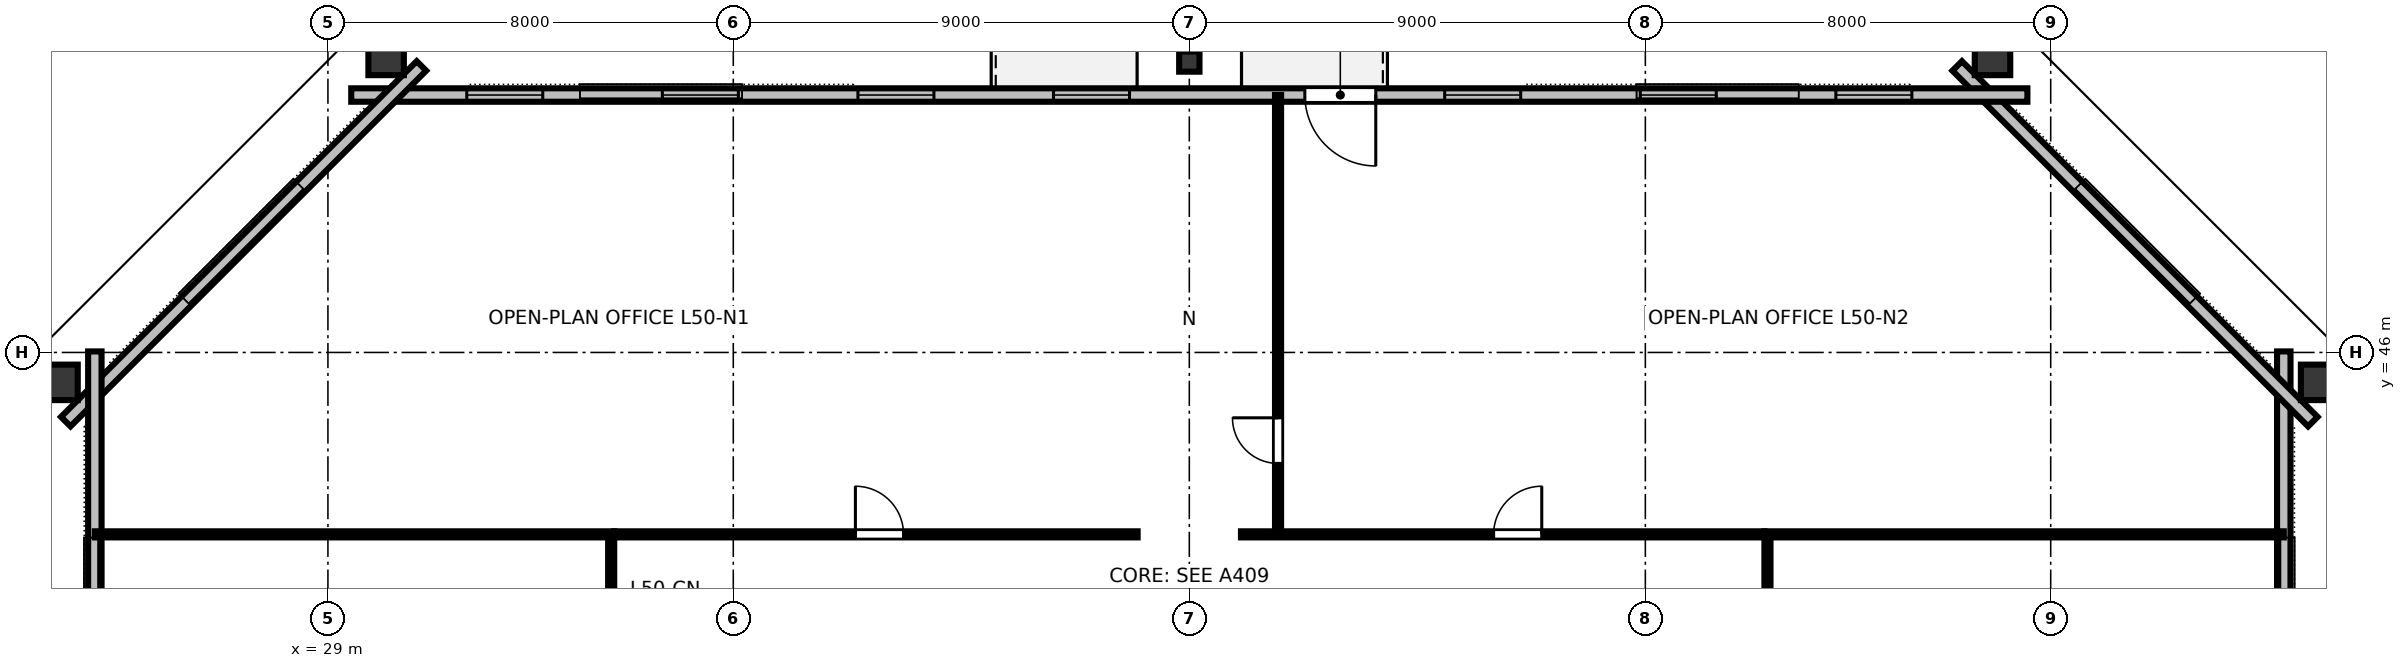
"""IFC4 building model, lengths in metres.
Left out: names, types, materials, properties, quantities, classifications, styles, units other than length and angle.
Written with IfcOpenShell. Run it as: python <this file> out.ifc"""

import sys

from ifc_helpers import new_model, si_unit, direction, frame, frame_2d, origin, origin_2d, place, context, subcontext, project, spatial, rectangle, hollow_rectangle, i_section, extrude, element, fill, save


model = new_model("IFC4")
c1 = context("Model", 3, precision=1e-05, world=origin(), true_north=direction((0.0, 1.0)))
c2 = subcontext(c1, "Body", "Model", "MODEL_VIEW")
j1 = project(units=[si_unit("LENGTHUNIT", "METRE"), si_unit("PLANEANGLEUNIT", "RADIAN")], contexts=[c1])
p1 = place(None, origin())
s1 = spatial("IfcSite", under=j1, at=p1, CompositionType="ELEMENT")
p2 = place(p1, origin())
s2 = spatial("IfcBuilding", under=s1, at=p2, CompositionType="ELEMENT")
p3 = place(p2, frame((0.0, 0.0, 191.4)))
s3 = spatial("IfcBuildingStorey", under=s2, at=p3, CompositionType="ELEMENT", Elevation=191.4)
for number, where, z_axis, x_axis in (
    (1, (68.363, 45.41, 0.0), (0.0, 0.0, 1.0), (0.0, 1.0, 0.0)),
    (2, (61.851, 51.897, 0.0), (0.0, 0.0, 1.0), (1.0, 0.0, 0.0)),
):
    element("IfcColumn", number, at=place(p3, frame(where, z_axis=z_axis, x_axis=x_axis)), inside=s3, PredefinedType="COLUMN", context=c2, shape_type="SweptSolid", body=[
        extrude(hollow_rectangle(XDim=0.7, YDim=0.85, WallThickness=0.04, at=origin_2d()), origin(), (0.0, 0.0, 1.0), 3.373),
    ])
p4 = place(p3, frame((46.0, 51.74, 0.0), z_axis=(0.0, 0.0, 1.0), x_axis=(1.0, 0.0, 0.0)))
e3 = element("IfcColumn", 3, at=p4, inside=s3, PredefinedType="COLUMN", context=c2, shape_type="SweptSolid", body=[
    extrude(i_section(OverallWidth=0.401, OverallDepth=0.399, WebThickness=0.025, FlangeThickness=0.04, FilletRadius=0.025, at=origin_2d()), origin(), (0.0, 0.0, 1.0), 3.373),
])
for number, where, z_axis, x_axis in (
    (4, (30.149, 51.897, 0.0), (0.0, 0.0, 1.0), (1.0, 0.0, 0.0)),
    (5, (23.637, 45.41, 0.0), (0.0, 0.0, 1.0), (0.0, 1.0, 0.0)),
):
    element("IfcColumn", number, at=place(p3, frame(where, z_axis=z_axis, x_axis=x_axis)), inside=s3, PredefinedType="COLUMN", context=c2, shape_type="SweptSolid", body=[
        extrude(hollow_rectangle(XDim=0.7, YDim=0.85, WallThickness=0.04, at=origin_2d()), origin(), (0.0, 0.0, 1.0), 3.373),
    ])
p5 = place(p3, frame((67.6, 17.98, 0.0), z_axis=(0.0, 0.0, 1.0), x_axis=(0.0, 1.0, 0.0)))
e6 = element("IfcWall", 6, at=p5, inside=s3, PredefinedType="STANDARD", context=c2, shape_type="SweptSolid", body=[
    extrude(rectangle(XDim=28.04, YDim=0.265, at=frame_2d((14.02, 0.0))), origin(), (0.0, 0.0, 1.0), 3.375),
])
p6 = place(p5, frame((5.887, 0.0, 0.85)))
e7 = element("IfcOpeningElement", 7, at=p6, cuts=e6, PredefinedType="OPENING", context=c2, shape_type="SweptSolid", body=[
    extrude(rectangle(XDim=1.5, YDim=1.85, at=frame_2d((0.75, 0.925))), frame((0.0, 0.142, 0.0), z_axis=(0.0, -1.0, 0.0), x_axis=(1.0, 0.0, 0.0)), (0.0, 0.0, 1.0), 0.285),
])
p7 = place(p5, frame((9.579, 0.0, 0.85)))
e8 = element("IfcOpeningElement", 8, at=p7, cuts=e6, PredefinedType="OPENING", context=c2, shape_type="SweptSolid", body=[
    extrude(rectangle(XDim=1.5, YDim=1.85, at=frame_2d((0.75, 0.925))), frame((0.0, 0.142, 0.0), z_axis=(0.0, -1.0, 0.0), x_axis=(1.0, 0.0, 0.0)), (0.0, 0.0, 1.0), 0.285),
])
p8 = place(p5, frame((16.961, 0.0, 0.85)))
e9 = element("IfcOpeningElement", 9, at=p8, cuts=e6, PredefinedType="OPENING", context=c2, shape_type="SweptSolid", body=[
    extrude(rectangle(XDim=1.5, YDim=1.85, at=frame_2d((0.75, 0.925))), frame((0.0, 0.142, 0.0), z_axis=(0.0, -1.0, 0.0), x_axis=(1.0, 0.0, 0.0)), (0.0, 0.0, 1.0), 0.285),
])
p9 = place(p5, frame((20.653, 0.0, 0.85)))
e10 = element("IfcOpeningElement", 10, at=p9, cuts=e6, PredefinedType="OPENING", context=c2, shape_type="SweptSolid", body=[
    extrude(rectangle(XDim=1.5, YDim=1.85, at=frame_2d((0.75, 0.925))), frame((0.0, 0.142, 0.0), z_axis=(0.0, -1.0, 0.0), x_axis=(1.0, 0.0, 0.0)), (0.0, 0.0, 1.0), 0.285),
])
p10 = place(p3, frame((68.174, 44.635, 0.0), z_axis=(0.0, 0.0, 1.0), x_axis=(-0.707106781187, 0.707106781187, 0.0)))
e11 = element("IfcWall", 11, at=p10, inside=s3, PredefinedType="STANDARD", context=c2, shape_type="SweptSolid", body=[
    extrude(rectangle(XDim=9.927, YDim=0.265, at=frame_2d((4.963, 0.0))), origin(), (0.0, 0.0, 1.0), 3.375),
])
p11 = place(p3, frame((62.54, 51.08, 0.0), z_axis=(0.0, 0.0, 1.0), x_axis=(-1.0, 0.0, 0.0)))
e12 = element("IfcWall", 12, at=p11, inside=s3, PredefinedType="STANDARD", context=c2, shape_type="SweptSolid", body=[
    extrude(rectangle(XDim=33.08, YDim=0.265, at=frame_2d((16.54, 0.0))), origin(), (0.0, 0.0, 1.0), 3.375),
])
p12 = place(p11, frame((12.86, 0.0, 0.0)))
e13 = element("IfcOpeningElement", 13, at=p12, cuts=e12, PredefinedType="OPENING", context=c2, shape_type="SweptSolid", body=[
    extrude(rectangle(XDim=1.4, YDim=2.15, at=frame_2d((0.7, 1.075))), frame((0.0, 0.142, 0.0), z_axis=(0.0, -1.0, 0.0), x_axis=(1.0, 0.0, 0.0)), (0.0, 0.0, 1.0), 0.285),
])
p13 = place(p11, frame((2.28, 0.0, 0.85)))
e14 = element("IfcOpeningElement", 14, at=p13, cuts=e12, PredefinedType="OPENING", context=c2, shape_type="SweptSolid", body=[
    extrude(rectangle(XDim=1.5, YDim=1.85, at=frame_2d((0.75, 0.925))), frame((0.0, 0.142, 0.0), z_axis=(0.0, -1.0, 0.0), x_axis=(1.0, 0.0, 0.0)), (0.0, 0.0, 1.0), 0.285),
])
p14 = place(p11, frame((6.14, 0.0, 0.85)))
e15 = element("IfcOpeningElement", 15, at=p14, cuts=e12, PredefinedType="OPENING", context=c2, shape_type="SweptSolid", body=[
    extrude(rectangle(XDim=1.5, YDim=1.85, at=frame_2d((0.75, 0.925))), frame((0.0, 0.142, 0.0), z_axis=(0.0, -1.0, 0.0), x_axis=(1.0, 0.0, 0.0)), (0.0, 0.0, 1.0), 0.285),
])
p15 = place(p11, frame((10.0, 0.0, 0.85)))
e16 = element("IfcOpeningElement", 16, at=p15, cuts=e12, PredefinedType="OPENING", context=c2, shape_type="SweptSolid", body=[
    extrude(rectangle(XDim=1.5, YDim=1.85, at=frame_2d((0.75, 0.925))), frame((0.0, 0.142, 0.0), z_axis=(0.0, -1.0, 0.0), x_axis=(1.0, 0.0, 0.0)), (0.0, 0.0, 1.0), 0.285),
])
p16 = place(p11, frame((17.72, 0.0, 0.85)))
e17 = element("IfcOpeningElement", 17, at=p16, cuts=e12, PredefinedType="OPENING", context=c2, shape_type="SweptSolid", body=[
    extrude(rectangle(XDim=1.5, YDim=1.85, at=frame_2d((0.75, 0.925))), frame((0.0, 0.142, 0.0), z_axis=(0.0, -1.0, 0.0), x_axis=(1.0, 0.0, 0.0)), (0.0, 0.0, 1.0), 0.285),
])
p17 = place(p11, frame((21.58, 0.0, 0.85)))
e18 = element("IfcOpeningElement", 18, at=p17, cuts=e12, PredefinedType="OPENING", context=c2, shape_type="SweptSolid", body=[
    extrude(rectangle(XDim=1.5, YDim=1.85, at=frame_2d((0.75, 0.925))), frame((0.0, 0.142, 0.0), z_axis=(0.0, -1.0, 0.0), x_axis=(1.0, 0.0, 0.0)), (0.0, 0.0, 1.0), 0.285),
])
p18 = place(p11, frame((25.44, 0.0, 0.85)))
e19 = element("IfcOpeningElement", 19, at=p18, cuts=e12, PredefinedType="OPENING", context=c2, shape_type="SweptSolid", body=[
    extrude(rectangle(XDim=1.5, YDim=1.85, at=frame_2d((0.75, 0.925))), frame((0.0, 0.142, 0.0), z_axis=(0.0, -1.0, 0.0), x_axis=(1.0, 0.0, 0.0)), (0.0, 0.0, 1.0), 0.285),
])
p19 = place(p11, frame((29.3, 0.0, 0.85)))
e20 = element("IfcOpeningElement", 20, at=p19, cuts=e12, PredefinedType="OPENING", context=c2, shape_type="SweptSolid", body=[
    extrude(rectangle(XDim=1.5, YDim=1.85, at=frame_2d((0.75, 0.925))), frame((0.0, 0.142, 0.0), z_axis=(0.0, -1.0, 0.0), x_axis=(1.0, 0.0, 0.0)), (0.0, 0.0, 1.0), 0.285),
])
p20 = place(p3, frame((30.845, 51.654, 0.0), z_axis=(0.0, 0.0, 1.0), x_axis=(-0.707106781187, -0.707106781187, 0.0)))
e21 = element("IfcWall", 21, at=p20, inside=s3, PredefinedType="STANDARD", context=c2, shape_type="SweptSolid", body=[
    extrude(rectangle(XDim=9.927, YDim=0.265, at=frame_2d((4.963, 0.0))), origin(), (0.0, 0.0, 1.0), 3.375),
])
p21 = place(p3, frame((24.4, 46.02, 0.0), z_axis=(0.0, 0.0, 1.0), x_axis=(0.0, -1.0, 0.0)))
e22 = element("IfcWall", 22, at=p21, inside=s3, PredefinedType="STANDARD", context=c2, shape_type="SweptSolid", body=[
    extrude(rectangle(XDim=28.04, YDim=0.265, at=frame_2d((14.02, 0.0))), origin(), (0.0, 0.0, 1.0), 3.375),
])
p22 = place(p21, frame((5.887, 0.0, 0.85)))
e23 = element("IfcOpeningElement", 23, at=p22, cuts=e22, PredefinedType="OPENING", context=c2, shape_type="SweptSolid", body=[
    extrude(rectangle(XDim=1.5, YDim=1.85, at=frame_2d((0.75, 0.925))), frame((0.0, 0.142, 0.0), z_axis=(0.0, -1.0, 0.0), x_axis=(1.0, 0.0, 0.0)), (0.0, 0.0, 1.0), 0.285),
])
p23 = place(p21, frame((16.961, 0.0, 0.85)))
e24 = element("IfcOpeningElement", 24, at=p23, cuts=e22, PredefinedType="OPENING", context=c2, shape_type="SweptSolid", body=[
    extrude(rectangle(XDim=1.5, YDim=1.85, at=frame_2d((0.75, 0.925))), frame((0.0, 0.142, 0.0), z_axis=(0.0, -1.0, 0.0), x_axis=(1.0, 0.0, 0.0)), (0.0, 0.0, 1.0), 0.285),
])
p24 = place(p21, frame((20.653, 0.0, 0.85)))
e25 = element("IfcOpeningElement", 25, at=p24, cuts=e22, PredefinedType="OPENING", context=c2, shape_type="SweptSolid", body=[
    extrude(rectangle(XDim=1.5, YDim=1.85, at=frame_2d((0.75, 0.925))), frame((0.0, 0.142, 0.0), z_axis=(0.0, -1.0, 0.0), x_axis=(1.0, 0.0, 0.0)), (0.0, 0.0, 1.0), 0.285),
])
p25 = place(p3, frame((47.751, 42.41, 0.0), z_axis=(0.0, 0.0, 1.0), x_axis=(0.0, 1.0, 0.0)))
e26 = element("IfcWall", 26, at=p25, inside=s3, PredefinedType="PARTITIONING", context=c2, shape_type="SweptSolid", body=[
    extrude(rectangle(XDim=8.67, YDim=0.12, at=frame_2d((4.335, 0.0))), origin(), (0.0, 0.0, 1.0), 2.655),
])
p26 = place(p25, frame((1.4, 0.0, 0.0)))
e27 = element("IfcOpeningElement", 27, at=p26, cuts=e26, PredefinedType="OPENING", context=c2, shape_type="SweptSolid", body=[
    extrude(rectangle(XDim=0.9, YDim=2.15, at=frame_2d((0.45, 1.075))), frame((0.0, 0.07, 0.0), z_axis=(0.0, -1.0, 0.0), x_axis=(1.0, 0.0, 0.0)), (0.0, 0.0, 1.0), 0.14),
])
p27 = place(p3, frame((34.65, 42.41, 0.0), z_axis=(0.0, 0.0, 1.0), x_axis=(1.0, 0.0, 0.0)))
e28 = element("IfcWall", 28, at=p27, inside=s3, PredefinedType="PARTITIONING", context=c2, shape_type="SweptSolid", body=[
    extrude(rectangle(XDim=10.33, YDim=0.12, at=frame_2d((5.165, 0.0))), origin(), (0.0, 0.0, 1.0), 2.655),
])
p28 = place(p27, frame((4.76, 0.0, 0.0)))
e29 = element("IfcOpeningElement", 29, at=p28, cuts=e28, PredefinedType="OPENING", context=c2, shape_type="SweptSolid", body=[
    extrude(rectangle(XDim=0.95, YDim=2.15, at=frame_2d((0.475, 1.075))), frame((0.0, 0.07, 0.0), z_axis=(0.0, -1.0, 0.0), x_axis=(1.0, 0.0, 0.0)), (0.0, 0.0, 1.0), 0.14),
])
p29 = place(p3, frame((47.02, 42.41, 0.0), z_axis=(0.0, 0.0, 1.0), x_axis=(1.0, 0.0, 0.0)))
e30 = element("IfcWall", 30, at=p29, inside=s3, PredefinedType="PARTITIONING", context=c2, shape_type="SweptSolid", body=[
    extrude(rectangle(XDim=10.33, YDim=0.12, at=frame_2d((5.165, 0.0))), origin(), (0.0, 0.0, 1.0), 2.655),
])
p30 = place(p29, frame((4.986, 0.0, 0.0)))
e31 = element("IfcOpeningElement", 31, at=p30, cuts=e30, PredefinedType="OPENING", context=c2, shape_type="SweptSolid", body=[
    extrude(rectangle(XDim=0.95, YDim=2.15, at=frame_2d((0.475, 1.075))), frame((0.0, 0.07, 0.0), z_axis=(0.0, -1.0, 0.0), x_axis=(1.0, 0.0, 0.0)), (0.0, 0.0, 1.0), 0.14),
])
p31 = place(p3, frame((34.59, 21.65, 0.0), z_axis=(0.0, 0.0, 1.0), x_axis=(0.0, 1.0, 0.0)))
e32 = element("IfcWall", 32, at=p31, inside=s3, PredefinedType="PARTITIONING", context=c2, shape_type="SweptSolid", body=[
    extrude(rectangle(XDim=20.7, YDim=0.12, at=frame_2d((10.35, 0.0))), origin(), (0.0, 0.0, 1.0), 2.655),
])
p32 = place(p31, frame((6.214, 0.0, 0.0)))
e33 = element("IfcOpeningElement", 33, at=p32, cuts=e32, PredefinedType="OPENING", context=c2, shape_type="SweptSolid", body=[
    extrude(rectangle(XDim=0.95, YDim=2.15, at=frame_2d((0.475, 1.075))), frame((0.0, 0.07, 0.0), z_axis=(0.0, -1.0, 0.0), x_axis=(1.0, 0.0, 0.0)), (0.0, 0.0, 1.0), 0.14),
])
p33 = place(p31, frame((16.365, 0.0, 0.0)))
e34 = element("IfcOpeningElement", 34, at=p33, cuts=e32, PredefinedType="OPENING", context=c2, shape_type="SweptSolid", body=[
    extrude(rectangle(XDim=0.95, YDim=2.15, at=frame_2d((0.475, 1.075))), frame((0.0, 0.07, 0.0), z_axis=(0.0, -1.0, 0.0), x_axis=(1.0, 0.0, 0.0)), (0.0, 0.0, 1.0), 0.14),
])
p34 = place(p3, frame((57.41, 21.65, 0.0), z_axis=(0.0, 0.0, 1.0), x_axis=(0.0, 1.0, 0.0)))
e35 = element("IfcWall", 35, at=p34, inside=s3, PredefinedType="PARTITIONING", context=c2, shape_type="SweptSolid", body=[
    extrude(rectangle(XDim=20.7, YDim=0.12, at=frame_2d((10.35, 0.0))), origin(), (0.0, 0.0, 1.0), 2.655),
])
p35 = place(p34, frame((9.875, 0.0, 0.0)))
e36 = element("IfcOpeningElement", 36, at=p35, cuts=e35, PredefinedType="OPENING", context=c2, shape_type="SweptSolid", body=[
    extrude(rectangle(XDim=0.95, YDim=2.15, at=frame_2d((0.475, 1.075))), frame((0.0, 0.07, 0.0), z_axis=(0.0, -1.0, 0.0), x_axis=(1.0, 0.0, 0.0)), (0.0, 0.0, 1.0), 0.14),
])
for number, where, z_axis, x_axis in (
    (37, (34.65, 42.41, 0.0), (0.0, 0.0, 1.0), (-1.0, 0.0, 0.0)),
    (38, (57.35, 42.41, 0.0), (0.0, 0.0, 1.0), (1.0, 0.0, 0.0)),
):
    element("IfcWall", number, at=place(p3, frame(where, z_axis=z_axis, x_axis=x_axis)), inside=s3, PredefinedType="PARTITIONING", context=c2, shape_type="SweptSolid", body=[
        extrude(rectangle(XDim=10.25, YDim=0.12, at=frame_2d((5.125, 0.0))), origin(), (0.0, 0.0, 1.0), 2.655),
    ])
p36 = place(p12, origin())
e39 = element("IfcDoor", 39, at=p36, inside=s3, OperationType="SINGLE_SWING_LEFT", PredefinedType="DOOR", context=c2, shape_type="SweptSolid", body=[
    extrude(rectangle(XDim=1.4, YDim=2.15, at=frame_2d((0.7, 1.075))), frame((0.0, 0.025, 0.0), z_axis=(0.0, -1.0, 0.0), x_axis=(1.0, 0.0, 0.0)), (0.0, 0.0, 1.0), 0.05),
])
fill(e13, e39)
p37 = place(p13, origin())
e40 = element("IfcWindow", 40, at=p37, inside=s3, PartitioningType="SINGLE_PANEL", PredefinedType="WINDOW", context=c2, shape_type="SweptSolid", body=[
    extrude(rectangle(XDim=1.5, YDim=1.85, at=frame_2d((0.75, 0.925))), frame((0.0, 0.03, 0.0), z_axis=(0.0, -1.0, 0.0), x_axis=(1.0, 0.0, 0.0)), (0.0, 0.0, 1.0), 0.06),
])
fill(e14, e40)
p38 = place(p14, origin())
e41 = element("IfcWindow", 41, at=p38, inside=s3, PartitioningType="SINGLE_PANEL", PredefinedType="WINDOW", context=c2, shape_type="SweptSolid", body=[
    extrude(rectangle(XDim=1.5, YDim=1.85, at=frame_2d((0.75, 0.925))), frame((0.0, 0.03, 0.0), z_axis=(0.0, -1.0, 0.0), x_axis=(1.0, 0.0, 0.0)), (0.0, 0.0, 1.0), 0.06),
])
fill(e15, e41)
p39 = place(p15, origin())
e42 = element("IfcWindow", 42, at=p39, inside=s3, PartitioningType="SINGLE_PANEL", PredefinedType="WINDOW", context=c2, shape_type="SweptSolid", body=[
    extrude(rectangle(XDim=1.5, YDim=1.85, at=frame_2d((0.75, 0.925))), frame((0.0, 0.03, 0.0), z_axis=(0.0, -1.0, 0.0), x_axis=(1.0, 0.0, 0.0)), (0.0, 0.0, 1.0), 0.06),
])
fill(e16, e42)
p40 = place(p16, origin())
e43 = element("IfcWindow", 43, at=p40, inside=s3, PartitioningType="SINGLE_PANEL", PredefinedType="WINDOW", context=c2, shape_type="SweptSolid", body=[
    extrude(rectangle(XDim=1.5, YDim=1.85, at=frame_2d((0.75, 0.925))), frame((0.0, 0.03, 0.0), z_axis=(0.0, -1.0, 0.0), x_axis=(1.0, 0.0, 0.0)), (0.0, 0.0, 1.0), 0.06),
])
fill(e17, e43)
p41 = place(p17, origin())
e44 = element("IfcWindow", 44, at=p41, inside=s3, PartitioningType="SINGLE_PANEL", PredefinedType="WINDOW", context=c2, shape_type="SweptSolid", body=[
    extrude(rectangle(XDim=1.5, YDim=1.85, at=frame_2d((0.75, 0.925))), frame((0.0, 0.03, 0.0), z_axis=(0.0, -1.0, 0.0), x_axis=(1.0, 0.0, 0.0)), (0.0, 0.0, 1.0), 0.06),
])
fill(e18, e44)
p42 = place(p18, origin())
e45 = element("IfcWindow", 45, at=p42, inside=s3, PartitioningType="SINGLE_PANEL", PredefinedType="WINDOW", context=c2, shape_type="SweptSolid", body=[
    extrude(rectangle(XDim=1.5, YDim=1.85, at=frame_2d((0.75, 0.925))), frame((0.0, 0.03, 0.0), z_axis=(0.0, -1.0, 0.0), x_axis=(1.0, 0.0, 0.0)), (0.0, 0.0, 1.0), 0.06),
])
fill(e19, e45)
p43 = place(p19, origin())
e46 = element("IfcWindow", 46, at=p43, inside=s3, PartitioningType="SINGLE_PANEL", PredefinedType="WINDOW", context=c2, shape_type="SweptSolid", body=[
    extrude(rectangle(XDim=1.5, YDim=1.85, at=frame_2d((0.75, 0.925))), frame((0.0, 0.03, 0.0), z_axis=(0.0, -1.0, 0.0), x_axis=(1.0, 0.0, 0.0)), (0.0, 0.0, 1.0), 0.06),
])
fill(e20, e46)
p44 = place(p26, origin())
e47 = element("IfcDoor", 47, at=p44, inside=s3, OperationType="SINGLE_SWING_RIGHT", PredefinedType="DOOR", context=c2, shape_type="SweptSolid", body=[
    extrude(rectangle(XDim=0.9, YDim=2.15, at=frame_2d((0.45, 1.075))), frame((0.0, 0.025, 0.0), z_axis=(0.0, -1.0, 0.0), x_axis=(1.0, 0.0, 0.0)), (0.0, 0.0, 1.0), 0.05),
])
fill(e27, e47)
p45 = place(p28, origin())
e48 = element("IfcDoor", 48, at=p45, inside=s3, OperationType="SINGLE_SWING_LEFT", PredefinedType="DOOR", context=c2, shape_type="SweptSolid", body=[
    extrude(rectangle(XDim=0.95, YDim=2.15, at=frame_2d((0.475, 1.075))), frame((0.0, 0.025, 0.0), z_axis=(0.0, -1.0, 0.0), x_axis=(1.0, 0.0, 0.0)), (0.0, 0.0, 1.0), 0.05),
])
fill(e29, e48)
p46 = place(p30, origin())
e49 = element("IfcDoor", 49, at=p46, inside=s3, OperationType="SINGLE_SWING_RIGHT", PredefinedType="DOOR", context=c2, shape_type="SweptSolid", body=[
    extrude(rectangle(XDim=0.95, YDim=2.15, at=frame_2d((0.475, 1.075))), frame((0.0, 0.025, 0.0), z_axis=(0.0, -1.0, 0.0), x_axis=(1.0, 0.0, 0.0)), (0.0, 0.0, 1.0), 0.05),
])
fill(e31, e49)
save(model, sys.argv[1])
